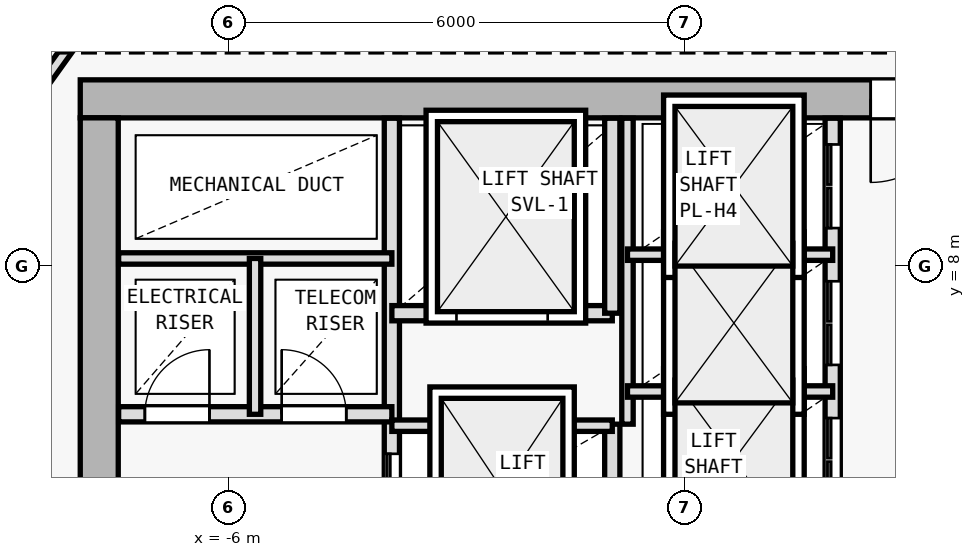
"""IFC4 building model, lengths in metres.
Left out: names, types, materials, properties, quantities, classifications, styles, units other than length and angle.
Written with IfcOpenShell. Run it as: python <this file> out.ifc"""

import sys

from ifc_helpers import new_model, si_unit, direction, frame, frame_2d, origin, origin_2d, place, context, subcontext, project, spatial, rectangle, i_section, extrude, element, fill, save


model = new_model("IFC4")
c1 = context("Model", 3, precision=1e-05, world=origin(), true_north=direction((0.0, 1.0)))
c2 = subcontext(c1, "Body", "Model", "MODEL_VIEW")
j1 = project(units=[si_unit("LENGTHUNIT", "METRE"), si_unit("PLANEANGLEUNIT", "RADIAN")], contexts=[c1])
p1 = place(None, origin())
s1 = spatial("IfcSite", under=j1, at=p1, CompositionType="ELEMENT")
p2 = place(p1, origin())
s2 = spatial("IfcBuilding", under=s1, at=p2, CompositionType="ELEMENT")
p3 = place(p2, frame((0.0, 0.0, 134.1)))
s3 = spatial("IfcBuildingStorey", under=s2, at=p3, CompositionType="ELEMENT", Elevation=134.1)
p4 = place(p3, frame((-7.7, 10.2, 0.0), z_axis=(0.0, 0.0, 1.0), x_axis=(1.0, 0.0, 0.0)))
e1 = element("IfcColumn", 1, at=p4, inside=s3, PredefinedType="COLUMN", context=c2, shape_type="SweptSolid", body=[
    extrude(i_section(OverallWidth=0.409, OverallDepth=0.425, WebThickness=0.021, FlangeThickness=0.034, FilletRadius=0.015, at=origin_2d()), origin(), (0.0, 0.0, 1.0), 4.5),
])
p5 = place(p3, frame((7.95, 10.2, 0.0), z_axis=(0.0, 0.0, 1.0), x_axis=(-1.0, 0.0, 0.0)))
e2 = element("IfcWall", 2, at=p5, inside=s3, PredefinedType="SHEAR", context=c2, shape_type="SweptSolid", body=[
    extrude(rectangle(XDim=15.9, YDim=0.5, at=frame_2d((7.95, 0.0))), origin(), (0.0, 0.0, 1.0), 4.25),
])
p6 = place(p5, frame((4.4, 0.0, 0.0)))
e3 = element("IfcOpeningElement", 3, at=p6, cuts=e2, PredefinedType="OPENING", context=c2, shape_type="SweptSolid", body=[
    extrude(rectangle(XDim=1.1, YDim=2.15, at=frame_2d((0.55, 1.075))), frame((0.0, 0.26, 0.0), z_axis=(0.0, -1.0, 0.0), x_axis=(1.0, 0.0, 0.0)), (0.0, 0.0, 1.0), 0.52),
])
p7 = place(p3, frame((-7.7, -9.15, 0.0), z_axis=(0.0, 0.0, 1.0), x_axis=(0.0, 1.0, 0.0)))
e4 = element("IfcWall", 4, at=p7, inside=s3, PredefinedType="SHEAR", context=c2, shape_type="SweptSolid", body=[
    extrude(rectangle(XDim=19.1, YDim=0.5, at=frame_2d((9.55, 0.0))), origin(), (0.0, 0.0, 1.0), 4.25),
])
p8 = place(p7, frame((12.7, 0.0, 0.0)))
e5 = element("IfcOpeningElement", 5, at=p8, cuts=e4, PredefinedType="OPENING", context=c2, shape_type="SweptSolid", body=[
    extrude(rectangle(XDim=1.1, YDim=2.15, at=frame_2d((0.55, 1.075))), frame((0.0, 0.26, 0.0), z_axis=(0.0, -1.0, 0.0), x_axis=(1.0, 0.0, 0.0)), (0.0, 0.0, 1.0), 0.52),
])
p9 = place(p3, frame((-3.85, 1.35, 0.0), z_axis=(0.0, 0.0, 1.0), x_axis=(0.0, 1.0, 0.0)))
e6 = element("IfcWall", 6, at=p9, inside=s3, PredefinedType="SOLIDWALL", context=c2, shape_type="SweptSolid", body=[
    extrude(rectangle(XDim=8.595, YDim=0.2, at=frame_2d((4.297, 0.0))), origin(), (0.0, 0.0, 1.0), 4.25),
])
p10 = place(p9, frame((1.5, 0.0, 0.0)))
e7 = element("IfcOpeningElement", 7, at=p10, cuts=e6, PredefinedType="OPENING", context=c2, shape_type="SweptSolid", body=[
    extrude(rectangle(XDim=1.0, YDim=2.15, at=frame_2d((0.5, 1.075))), frame((0.0, 0.11, 0.0), z_axis=(0.0, -1.0, 0.0), x_axis=(1.0, 0.0, 0.0)), (0.0, 0.0, 1.0), 0.22),
])
p11 = place(p9, frame((3.18, 0.0, 0.0)))
e8 = element("IfcOpeningElement", 8, at=p11, cuts=e6, PredefinedType="OPENING", context=c2, shape_type="SweptSolid", body=[
    extrude(rectangle(XDim=1.0, YDim=2.15, at=frame_2d((0.5, 1.075))), frame((0.0, 0.11, 0.0), z_axis=(0.0, -1.0, 0.0), x_axis=(1.0, 0.0, 0.0)), (0.0, 0.0, 1.0), 0.22),
])
p12 = place(p3, frame((-7.445, 6.05, 0.0), z_axis=(0.0, 0.0, 1.0), x_axis=(1.0, 0.0, 0.0)))
e9 = element("IfcWall", 9, at=p12, inside=s3, PredefinedType="SOLIDWALL", context=c2, shape_type="SweptSolid", body=[
    extrude(rectangle(XDim=3.595, YDim=0.2, at=frame_2d((1.797, 0.0))), origin(), (0.0, 0.0, 1.0), 4.25),
])
p13 = place(p12, frame((0.345, 0.0, 0.0)))
e10 = element("IfcOpeningElement", 10, at=p13, cuts=e9, PredefinedType="OPENING", context=c2, shape_type="SweptSolid", body=[
    extrude(rectangle(XDim=0.85, YDim=2.1, at=frame_2d((0.425, 1.05))), frame((0.0, 0.11, 0.0), z_axis=(0.0, -1.0, 0.0), x_axis=(1.0, 0.0, 0.0)), (0.0, 0.0, 1.0), 0.22),
])
p14 = place(p12, frame((2.145, 0.0, 0.0)))
e11 = element("IfcOpeningElement", 11, at=p14, cuts=e9, PredefinedType="OPENING", context=c2, shape_type="SweptSolid", body=[
    extrude(rectangle(XDim=0.85, YDim=2.1, at=frame_2d((0.425, 1.05))), frame((0.0, 0.11, 0.0), z_axis=(0.0, -1.0, 0.0), x_axis=(1.0, 0.0, 0.0)), (0.0, 0.0, 1.0), 0.22),
])
p15 = place(p3, frame((-7.445, 8.1, 0.0), z_axis=(0.0, 0.0, 1.0), x_axis=(1.0, 0.0, 0.0)))
e12 = element("IfcWall", 12, at=p15, inside=s3, PredefinedType="PARTITIONING", context=c2, shape_type="SweptSolid", body=[
    extrude(rectangle(XDim=3.595, YDim=0.15, at=frame_2d((1.797, 0.0))), origin(), (0.0, 0.0, 1.0), 4.25),
])
p16 = place(p3, frame((-5.65, 6.05, 0.0), z_axis=(0.0, 0.0, 1.0), x_axis=(0.0, 1.0, 0.0)))
e13 = element("IfcWall", 13, at=p16, inside=s3, PredefinedType="PARTITIONING", context=c2, shape_type="SweptSolid", body=[
    extrude(rectangle(XDim=2.05, YDim=0.15, at=frame_2d((1.025, 0.0))), origin(), (0.0, 0.0, 1.0), 4.25),
])
p17 = place(p3, frame((-0.95, 2.65, 0.0), z_axis=(0.0, 0.0, 1.0), x_axis=(0.0, 1.0, 0.0)))
e14 = element("IfcWall", 14, at=p17, inside=s3, PredefinedType="SOLIDWALL", context=c2, shape_type="SweptSolid", body=[
    extrude(rectangle(XDim=3.27, YDim=0.2, at=frame_2d((1.635, 0.0))), origin(), (0.0, 0.0, 1.0), 4.25),
])
p18 = place(p3, frame((-3.85, 5.9, 0.0), z_axis=(0.0, 0.0, 1.0), x_axis=(1.0, 0.0, 0.0)))
e15 = element("IfcWall", 15, at=p18, inside=s3, PredefinedType="PARTITIONING", context=c2, shape_type="SweptSolid", body=[
    extrude(rectangle(XDim=2.9, YDim=0.15, at=frame_2d((1.45, 0.0))), origin(), (0.0, 0.0, 1.0), 4.25),
])
p19 = place(p3, frame((-3.85, 7.38, 0.0), z_axis=(0.0, 0.0, 1.0), x_axis=(1.0, 0.0, 0.0)))
e16 = element("IfcWall", 16, at=p19, inside=s3, PredefinedType="SOLIDWALL", context=c2, shape_type="SweptSolid", body=[
    extrude(rectangle(XDim=2.9, YDim=0.2, at=frame_2d((1.45, 0.0))), origin(), (0.0, 0.0, 1.0), 4.25),
])
p20 = place(p19, frame((0.85, 0.0, 0.0)))
e17 = element("IfcOpeningElement", 17, at=p20, cuts=e16, PredefinedType="OPENING", context=c2, shape_type="SweptSolid", body=[
    extrude(rectangle(XDim=1.2, YDim=2.2, at=frame_2d((0.6, 1.1))), frame((0.0, 0.11, 0.0), z_axis=(0.0, -1.0, 0.0), x_axis=(1.0, 0.0, 0.0)), (0.0, 0.0, 1.0), 0.22),
])
p21 = place(p3, frame((-0.95, 7.38, 0.0), z_axis=(0.0, 0.0, 1.0), x_axis=(0.0, 1.0, 0.0)))
e18 = element("IfcWall", 18, at=p21, inside=s3, PredefinedType="SOLIDWALL", context=c2, shape_type="SweptSolid", body=[
    extrude(rectangle(XDim=2.565, YDim=0.2, at=frame_2d((1.283, 0.0))), origin(), (0.0, 0.0, 1.0), 4.25),
])
p22 = place(p3, frame((1.95, 2.65, 0.0), z_axis=(0.0, 0.0, 1.0), x_axis=(0.0, 1.0, 0.0)))
e19 = element("IfcWall", 19, at=p22, inside=s3, PredefinedType="SOLIDWALL", context=c2, shape_type="SweptSolid", body=[
    extrude(rectangle(XDim=7.295, YDim=0.2, at=frame_2d((3.647, 0.0))), origin(), (0.0, 0.0, 1.0), 4.25),
])
p23 = place(p22, frame((0.45, 0.0, 0.0)))
e20 = element("IfcOpeningElement", 20, at=p23, cuts=e19, PredefinedType="OPENING", context=c2, shape_type="SweptSolid", body=[
    extrude(rectangle(XDim=1.1, YDim=2.15, at=frame_2d((0.55, 1.075))), frame((0.0, 0.11, 0.0), z_axis=(0.0, -1.0, 0.0), x_axis=(1.0, 0.0, 0.0)), (0.0, 0.0, 1.0), 0.22),
])
p24 = place(p22, frame((2.25, 0.0, 0.0)))
e21 = element("IfcOpeningElement", 21, at=p24, cuts=e19, PredefinedType="OPENING", context=c2, shape_type="SweptSolid", body=[
    extrude(rectangle(XDim=1.1, YDim=2.15, at=frame_2d((0.55, 1.075))), frame((0.0, 0.11, 0.0), z_axis=(0.0, -1.0, 0.0), x_axis=(1.0, 0.0, 0.0)), (0.0, 0.0, 1.0), 0.22),
])
p25 = place(p22, frame((4.05, 0.0, 0.0)))
e22 = element("IfcOpeningElement", 22, at=p25, cuts=e19, PredefinedType="OPENING", context=c2, shape_type="SweptSolid", body=[
    extrude(rectangle(XDim=1.1, YDim=2.15, at=frame_2d((0.55, 1.075))), frame((0.0, 0.11, 0.0), z_axis=(0.0, -1.0, 0.0), x_axis=(1.0, 0.0, 0.0)), (0.0, 0.0, 1.0), 0.22),
])
p26 = place(p22, frame((5.85, 0.0, 0.0)))
e23 = element("IfcOpeningElement", 23, at=p26, cuts=e19, PredefinedType="OPENING", context=c2, shape_type="SweptSolid", body=[
    extrude(rectangle(XDim=1.1, YDim=2.15, at=frame_2d((0.55, 1.075))), frame((0.0, 0.11, 0.0), z_axis=(0.0, -1.0, 0.0), x_axis=(1.0, 0.0, 0.0)), (0.0, 0.0, 1.0), 0.22),
])
p27 = place(p3, frame((-0.75, 5.92, 0.0), z_axis=(0.0, 0.0, 1.0), x_axis=(0.0, 1.0, 0.0)))
e24 = element("IfcWall", 24, at=p27, inside=s3, PredefinedType="PARTITIONING", context=c2, shape_type="SweptSolid", body=[
    extrude(rectangle(XDim=4.025, YDim=0.15, at=frame_2d((2.013, 0.0))), origin(), (0.0, 0.0, 1.0), 4.25),
])
for number, where, z_axis, x_axis in (
    (25, (-0.75, 6.35, 0.0), (0.0, 0.0, 1.0), (1.0, 0.0, 0.0)),
    (26, (-0.75, 8.15, 0.0), (0.0, 0.0, 1.0), (1.0, 0.0, 0.0)),
):
    element("IfcWall", number, at=place(p3, frame(where, z_axis=z_axis, x_axis=x_axis)), inside=s3, PredefinedType="PARTITIONING", context=c2, shape_type="SweptSolid", body=[
        extrude(rectangle(XDim=2.7, YDim=0.15, at=frame_2d((1.35, 0.0))), origin(), (0.0, 0.0, 1.0), 4.25),
    ])
p28 = place(p3, frame((-9.86, 8.426, 0.0), z_axis=(0.0, 0.0, 1.0), x_axis=(0.582449511476, 0.812866881218, 0.0)))
e27 = element("IfcWall", 27, at=p28, inside=s3, PredefinedType="PARTITIONING", context=c2, shape_type="SweptSolid", body=[
    extrude(rectangle(XDim=4.84, YDim=0.15, at=frame_2d((2.42, 0.0))), origin(), (0.0, 0.0, 1.0), 3.865),
])
p29 = place(p6, origin())
e28 = element("IfcDoor", 28, at=p29, inside=s3, OperationType="SINGLE_SWING_RIGHT", PredefinedType="DOOR", context=c2, shape_type="SweptSolid", body=[
    extrude(rectangle(XDim=1.1, YDim=2.15, at=frame_2d((0.55, 1.075))), frame((0.0, 0.025, 0.0), z_axis=(0.0, -1.0, 0.0), x_axis=(1.0, 0.0, 0.0)), (0.0, 0.0, 1.0), 0.05),
])
fill(e3, e28)
p30 = place(p13, origin())
e29 = element("IfcDoor", 29, at=p30, inside=s3, OperationType="SINGLE_SWING_RIGHT", PredefinedType="DOOR", context=c2, shape_type="SweptSolid", body=[
    extrude(rectangle(XDim=0.85, YDim=2.1, at=frame_2d((0.425, 1.05))), frame((0.0, 0.025, 0.0), z_axis=(0.0, -1.0, 0.0), x_axis=(1.0, 0.0, 0.0)), (0.0, 0.0, 1.0), 0.05),
])
fill(e10, e29)
p31 = place(p14, origin())
e30 = element("IfcDoor", 30, at=p31, inside=s3, OperationType="SINGLE_SWING_LEFT", PredefinedType="DOOR", context=c2, shape_type="SweptSolid", body=[
    extrude(rectangle(XDim=0.85, YDim=2.1, at=frame_2d((0.425, 1.05))), frame((0.0, 0.025, 0.0), z_axis=(0.0, -1.0, 0.0), x_axis=(1.0, 0.0, 0.0)), (0.0, 0.0, 1.0), 0.05),
])
fill(e11, e30)
p32 = place(p20, origin())
e31 = element("IfcDoor", 31, at=p32, inside=s3, OperationType="DOUBLE_DOOR_SLIDING", PredefinedType="DOOR", context=c2, shape_type="SweptSolid", body=[
    extrude(rectangle(XDim=1.2, YDim=2.2, at=frame_2d((0.6, 1.1))), frame((0.0, 0.025, 0.0), z_axis=(0.0, -1.0, 0.0), x_axis=(1.0, 0.0, 0.0)), (0.0, 0.0, 1.0), 0.05),
])
fill(e17, e31)
p33 = place(p24, origin())
e32 = element("IfcDoor", 32, at=p33, inside=s3, OperationType="DOUBLE_DOOR_SLIDING", PredefinedType="DOOR", context=c2, shape_type="SweptSolid", body=[
    extrude(rectangle(XDim=1.1, YDim=2.15, at=frame_2d((0.55, 1.075))), frame((0.0, 0.025, 0.0), z_axis=(0.0, -1.0, 0.0), x_axis=(1.0, 0.0, 0.0)), (0.0, 0.0, 1.0), 0.05),
])
fill(e21, e32)
p34 = place(p25, origin())
e33 = element("IfcDoor", 33, at=p34, inside=s3, OperationType="DOUBLE_DOOR_SLIDING", PredefinedType="DOOR", context=c2, shape_type="SweptSolid", body=[
    extrude(rectangle(XDim=1.1, YDim=2.15, at=frame_2d((0.55, 1.075))), frame((0.0, 0.025, 0.0), z_axis=(0.0, -1.0, 0.0), x_axis=(1.0, 0.0, 0.0)), (0.0, 0.0, 1.0), 0.05),
])
fill(e22, e33)
p35 = place(p26, origin())
e34 = element("IfcDoor", 34, at=p35, inside=s3, OperationType="DOUBLE_DOOR_SLIDING", PredefinedType="DOOR", context=c2, shape_type="SweptSolid", body=[
    extrude(rectangle(XDim=1.1, YDim=2.15, at=frame_2d((0.55, 1.075))), frame((0.0, 0.025, 0.0), z_axis=(0.0, -1.0, 0.0), x_axis=(1.0, 0.0, 0.0)), (0.0, 0.0, 1.0), 0.05),
])
fill(e23, e34)
p36 = place(p11, origin())
e35 = element("IfcDoor", 35, at=p36, inside=s3, OperationType="DOUBLE_DOOR_SLIDING", PredefinedType="DOOR", context=c2, shape_type="SweptSolid", body=[
    extrude(rectangle(XDim=1.0, YDim=2.15, at=frame_2d((0.5, 1.075))), frame((0.0, 0.025, 0.0), z_axis=(0.0, -1.0, 0.0), x_axis=(1.0, 0.0, 0.0)), (0.0, 0.0, 1.0), 0.05),
])
fill(e8, e35)
save(model, sys.argv[1])
